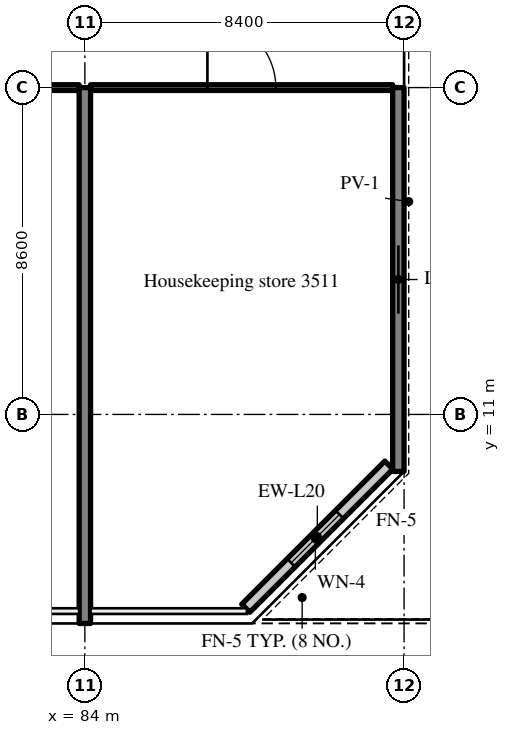
"""IFC4 building model, lengths in metres.
Left out: names, types, materials, properties, quantities, classifications, styles, units other than length and angle.
Written with IfcOpenShell. Run it as: python <this file> out.ifc"""

import sys

from ifc_helpers import new_model, si_unit, direction, frame, frame_2d, origin, place, context, subcontext, project, spatial, rectangle, extrude, source, transform, mapped, element, fill, save


model = new_model("IFC4")
c1 = context("Model", 3, precision=1e-05, world=origin(), true_north=direction((0.0, 1.0)))
c2 = subcontext(c1, "Body", "Model", "MODEL_VIEW")
j1 = project(units=[si_unit("LENGTHUNIT", "METRE"), si_unit("PLANEANGLEUNIT", "RADIAN")], contexts=[c1])
p1 = place(None, origin())
s1 = spatial("IfcSite", under=j1, at=p1, CompositionType="ELEMENT")
p2 = place(p1, origin())
s2 = spatial("IfcBuilding", under=s1, at=p2, CompositionType="ELEMENT")
p3 = place(p2, frame((0.0, 0.0, 146.2)))
s3 = spatial("IfcBuildingStorey", under=s2, at=p3, CompositionType="ELEMENT", Elevation=146.2)
m1 = source(origin(), c2, "Body", "SweptSolid", [
    extrude(rectangle(XDim=14.1, YDim=0.3, at=frame_2d((7.05, 0.0))), origin(), (0.0, 0.0, 1.0), 5.12),
])
p4 = place(p3, frame((84.0, 5.5, 0.0), z_axis=(0.0, 0.0, 1.0), x_axis=(0.0, 1.0, 0.0)))
e1 = element("IfcWall", 1, at=p4, inside=s3, PredefinedType="SHEAR", context=c2, shape_type="MappedRepresentation", body=[
    mapped(m1, transform((0.0, 0.0, 0.0), scale=1.0)),
])
m2 = source(origin(), c2, "Body", "SweptSolid", [
    extrude(rectangle(XDim=10.1, YDim=0.3, at=frame_2d((5.05, 0.0))), origin(), (0.0, 0.0, 1.0), 5.12),
])
p5 = place(p3, frame((92.25, 9.5, 0.0), z_axis=(0.0, 0.0, 1.0), x_axis=(0.0, 1.0, 0.0)))
e2 = element("IfcWall", 2, at=p5, inside=s3, PredefinedType="SHEAR", context=c2, shape_type="MappedRepresentation", body=[
    mapped(m2, transform((0.0, 0.0, 0.0), scale=1.0)),
])
m3 = source(origin(), c2, "Body", "SweptSolid", [
    extrude(rectangle(XDim=1.8, YDim=2.4, at=frame_2d((0.9, 1.2))), frame((0.0, 0.16, 0.0), z_axis=(0.0, -1.0, 0.0), x_axis=(1.0, 0.0, 0.0)), (0.0, 0.0, 1.0), 0.32),
])
p6 = place(p5, frame((4.15, 0.0, 0.0)))
e3 = element("IfcOpeningElement", 3, at=p6, cuts=e2, PredefinedType="OPENING", context=c2, shape_type="MappedRepresentation", body=[
    mapped(m3, transform((0.0, 0.0, 0.0), scale=1.0)),
])
m4 = source(origin(), c2, "Body", "SweptSolid", [
    extrude(rectangle(XDim=5.326, YDim=0.3, at=frame_2d((2.663, 0.0))), origin(), (0.0, 0.0, 1.0), 5.12),
])
p7 = place(p3, frame((88.234, 5.9, 0.0), z_axis=(0.0, 0.0, 1.0), x_axis=(0.707083859269, 0.707129702361, 0.0)))
e4 = element("IfcWall", 4, at=p7, inside=s3, PredefinedType="SOLIDWALL", context=c2, shape_type="MappedRepresentation", body=[
    mapped(m4, transform((0.0, 0.0, 0.0), scale=1.0)),
])
m5 = source(origin(), c2, "Body", "SweptSolid", [
    extrude(rectangle(XDim=1.8, YDim=1.5, at=frame_2d((0.9, 0.75))), frame((0.0, 0.16, 0.0), z_axis=(0.0, -1.0, 0.0), x_axis=(1.0, 0.0, 0.0)), (0.0, 0.0, 1.0), 0.32),
])
p8 = place(p7, frame((1.689, 0.0, 0.9)))
e5 = element("IfcOpeningElement", 5, at=p8, cuts=e4, PredefinedType="OPENING", context=c2, shape_type="MappedRepresentation", body=[
    mapped(m5, transform((0.0, 0.0, 0.0), scale=1.0)),
])
m6 = source(origin(), c2, "Body", "SweptSolid", [
    extrude(rectangle(XDim=8.1, YDim=0.15, at=frame_2d((4.05, 0.0))), origin(), (0.0, 0.0, 1.0), 4.42),
])
p9 = place(p3, frame((75.75, 19.6, 0.0), z_axis=(0.0, 0.0, 1.0), x_axis=(1.0, 0.0, 0.0)))
e6 = element("IfcWall", 6, at=p9, inside=s3, PredefinedType="PARTITIONING", context=c2, shape_type="MappedRepresentation", body=[
    mapped(m6, transform((0.0, 0.0, 0.0), scale=1.0)),
])
m7 = source(origin(), c2, "Body", "SweptSolid", [
    extrude(rectangle(XDim=1.8, YDim=2.1, at=frame_2d((0.9, 1.05))), frame((0.0, 0.085, 0.0), z_axis=(0.0, -1.0, 0.0), x_axis=(1.0, 0.0, 0.0)), (0.0, 0.0, 1.0), 0.17),
])
p10 = place(p9, frame((3.15, 0.0, 0.0)))
e7 = element("IfcOpeningElement", 7, at=p10, cuts=e6, PredefinedType="OPENING", context=c2, shape_type="MappedRepresentation", body=[
    mapped(m7, transform((0.0, 0.0, 0.0), scale=1.0)),
])
m8 = source(origin(), c2, "Body", "SweptSolid", [
    extrude(rectangle(XDim=7.95, YDim=0.15, at=frame_2d((3.975, 0.0))), origin(), (0.0, 0.0, 1.0), 4.42),
])
p11 = place(p3, frame((84.15, 19.6, 0.0), z_axis=(0.0, 0.0, 1.0), x_axis=(1.0, 0.0, 0.0)))
e8 = element("IfcWall", 8, at=p11, inside=s3, PredefinedType="PARTITIONING", context=c2, shape_type="MappedRepresentation", body=[
    mapped(m8, transform((0.0, 0.0, 0.0), scale=1.0)),
])
p12 = place(p11, frame((3.075, 0.0, 0.0)))
e9 = element("IfcOpeningElement", 9, at=p12, cuts=e8, PredefinedType="OPENING", context=c2, shape_type="MappedRepresentation", body=[
    mapped(m7, transform((0.0, 0.0, 0.0), scale=1.0)),
])
m9 = source(origin(), c2, "Body", "SweptSolid", [
    extrude(rectangle(XDim=1.8, YDim=1.5, at=frame_2d((0.9, 0.75))), frame((0.0, 0.03, 0.0), z_axis=(0.0, -1.0, 0.0), x_axis=(1.0, 0.0, 0.0)), (0.0, 0.0, 1.0), 0.06),
])
p13 = place(p8, origin())
e10 = element("IfcWindow", 10, at=p13, inside=s3, PartitioningType="SINGLE_PANEL", PredefinedType="WINDOW", context=c2, shape_type="MappedRepresentation", body=[
    mapped(m9, transform((0.0, 0.0, 0.0), scale=1.0)),
])
fill(e5, e10)
m10 = source(origin(), c2, "Body", "SweptSolid", [
    extrude(rectangle(XDim=1.8, YDim=2.4, at=frame_2d((0.9, 1.2))), frame((0.0, 0.025, 0.0), z_axis=(0.0, -1.0, 0.0), x_axis=(1.0, 0.0, 0.0)), (0.0, 0.0, 1.0), 0.05),
])
p14 = place(p6, origin())
e11 = element("IfcDoor", 11, at=p14, inside=s3, OperationType="SLIDING_TO_RIGHT", PredefinedType="DOOR", context=c2, shape_type="MappedRepresentation", body=[
    mapped(m10, transform((0.0, 0.0, 0.0), scale=1.0)),
])
fill(e3, e11)
m11 = source(origin(), c2, "Body", "SweptSolid", [
    extrude(rectangle(XDim=1.8, YDim=2.1, at=frame_2d((0.9, 1.05))), frame((0.0, 0.025, 0.0), z_axis=(0.0, -1.0, 0.0), x_axis=(1.0, 0.0, 0.0)), (0.0, 0.0, 1.0), 0.05),
])
p15 = place(p12, origin())
e12 = element("IfcDoor", 12, at=p15, inside=s3, OperationType="DOUBLE_DOOR_SINGLE_SWING", PredefinedType="DOOR", context=c2, shape_type="MappedRepresentation", body=[
    mapped(m11, transform((0.0, 0.0, 0.0), scale=1.0)),
])
fill(e9, e12)
save(model, sys.argv[1])
